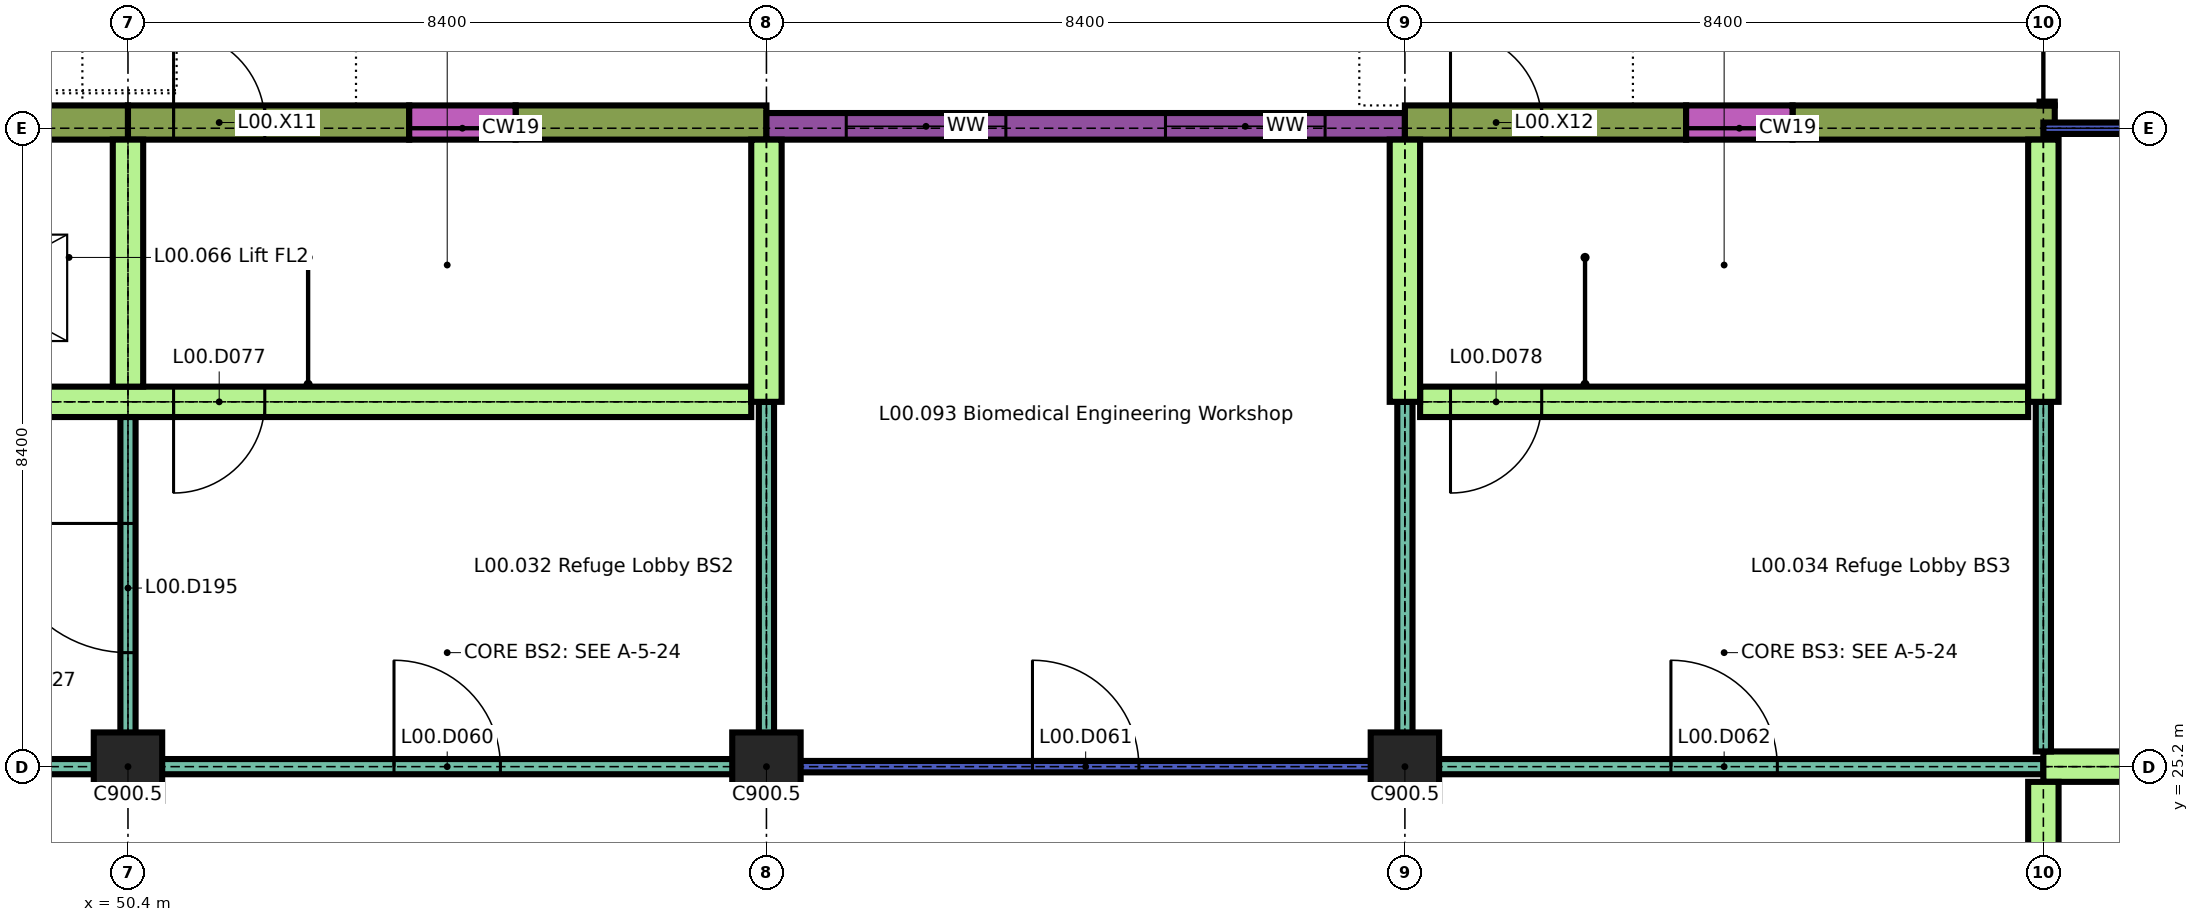
"""IFC4 building model, lengths in metres.
Left out: names, types, materials, properties, quantities, classifications, styles, units other than length and angle.
Written with IfcOpenShell. Run it as: python <this file> out.ifc"""

import sys

from ifc_helpers import new_model, si_unit, direction, frame, frame_2d, origin, origin_2d, place, context, subcontext, project, spatial, rectangle, extrude, element, fill, save


model = new_model("IFC4")
c1 = context("Model", 3, precision=1e-05, world=origin(), true_north=direction((0.0, 1.0)))
c2 = subcontext(c1, "Body", "Model", "MODEL_VIEW")
j1 = project(units=[si_unit("LENGTHUNIT", "METRE"), si_unit("PLANEANGLEUNIT", "RADIAN")], contexts=[c1])
p1 = place(None, origin())
s1 = spatial("IfcSite", under=j1, at=p1, CompositionType="ELEMENT")
p2 = place(p1, origin())
s2 = spatial("IfcBuilding", under=s1, at=p2, CompositionType="ELEMENT")
p3 = place(p2, origin())
s3 = spatial("IfcBuildingStorey", under=s2, at=p3, CompositionType="ELEMENT", Elevation=0.0)
p4 = place(p3, frame((46.2, 33.675, 0.0), z_axis=(0.0, 0.0, 1.0), x_axis=(1.0, 0.0, 0.0)))
e1 = element("IfcWall", 1, at=p4, inside=s3, PredefinedType="SOLIDWALL", context=c2, shape_type="SweptSolid", body=[
    extrude(rectangle(XDim=4.2, YDim=0.45, at=frame_2d((2.1, 0.0))), origin(), (0.0, 0.0, 1.0), 4.14),
])
p5 = place(p3, frame((50.4, 33.675, 0.0), z_axis=(0.0, 0.0, 1.0), x_axis=(1.0, 0.0, 0.0)))
e2 = element("IfcWall", 2, at=p5, inside=s3, PredefinedType="SOLIDWALL", context=c2, shape_type="SweptSolid", body=[
    extrude(rectangle(XDim=3.7, YDim=0.45, at=frame_2d((1.85, 0.0))), origin(), (0.0, 0.0, 1.0), 4.14),
])
p6 = place(p5, frame((0.6, 0.0, 0.0)))
e3 = element("IfcOpeningElement", 3, at=p6, cuts=e2, PredefinedType="OPENING", context=c2, shape_type="SweptSolid", body=[
    extrude(rectangle(XDim=1.2, YDim=2.1, at=frame_2d((0.6, 1.05))), frame((0.0, 0.235, 0.0), z_axis=(0.0, -1.0, 0.0), x_axis=(1.0, 0.0, 0.0)), (0.0, 0.0, 1.0), 0.47),
])
p7 = place(p3, frame((55.5, 33.675, 0.0), z_axis=(0.0, 0.0, 1.0), x_axis=(1.0, 0.0, 0.0)))
e4 = element("IfcWall", 4, at=p7, inside=s3, PredefinedType="SOLIDWALL", context=c2, shape_type="SweptSolid", body=[
    extrude(rectangle(XDim=3.3, YDim=0.45, at=frame_2d((1.65, 0.0))), origin(), (0.0, 0.0, 1.0), 4.14),
])
p8 = place(p3, frame((54.1, 33.675, 0.0), z_axis=(0.0, 0.0, 1.0), x_axis=(1.0, 0.0, 0.0)))
e5 = element("IfcWall", 5, at=p8, inside=s3, PredefinedType="SOLIDWALL", context=c2, shape_type="SweptSolid", body=[
    extrude(rectangle(XDim=1.4, YDim=0.45, at=frame_2d((0.7, 0.0))), origin(), (0.0, 0.0, 1.0), 0.6),
])
p9 = place(p3, frame((58.8, 33.625, 0.0), z_axis=(0.0, 0.0, 1.0), x_axis=(1.0, 0.0, 0.0)))
e6 = element("IfcWall", 6, at=p9, inside=s3, PredefinedType="SOLIDWALL", context=c2, shape_type="SweptSolid", body=[
    extrude(rectangle(XDim=8.4, YDim=0.35, at=frame_2d((4.2, 0.0))), origin(), (0.0, 0.0, 1.0), 3.84),
])
p10 = place(p9, frame((1.05, 0.0, 2.4)))
e7 = element("IfcOpeningElement", 7, at=p10, cuts=e6, PredefinedType="OPENING", context=c2, shape_type="SweptSolid", body=[
    extrude(rectangle(XDim=2.1, YDim=0.9, at=frame_2d((1.05, 0.45))), frame((0.0, 0.185, 0.0), z_axis=(0.0, -1.0, 0.0), x_axis=(1.0, 0.0, 0.0)), (0.0, 0.0, 1.0), 0.37),
])
p11 = place(p9, frame((5.25, 0.0, 2.4)))
e8 = element("IfcOpeningElement", 8, at=p11, cuts=e6, PredefinedType="OPENING", context=c2, shape_type="SweptSolid", body=[
    extrude(rectangle(XDim=2.1, YDim=0.9, at=frame_2d((1.05, 0.45))), frame((0.0, 0.185, 0.0), z_axis=(0.0, -1.0, 0.0), x_axis=(1.0, 0.0, 0.0)), (0.0, 0.0, 1.0), 0.37),
])
p12 = place(p3, frame((67.2, 33.675, 0.0), z_axis=(0.0, 0.0, 1.0), x_axis=(1.0, 0.0, 0.0)))
e9 = element("IfcWall", 9, at=p12, inside=s3, PredefinedType="SOLIDWALL", context=c2, shape_type="SweptSolid", body=[
    extrude(rectangle(XDim=3.7, YDim=0.45, at=frame_2d((1.85, 0.0))), origin(), (0.0, 0.0, 1.0), 4.14),
])
p13 = place(p12, frame((0.6, 0.0, 0.0)))
e10 = element("IfcOpeningElement", 10, at=p13, cuts=e9, PredefinedType="OPENING", context=c2, shape_type="SweptSolid", body=[
    extrude(rectangle(XDim=1.2, YDim=2.1, at=frame_2d((0.6, 1.05))), frame((0.0, 0.235, 0.0), z_axis=(0.0, -1.0, 0.0), x_axis=(1.0, 0.0, 0.0)), (0.0, 0.0, 1.0), 0.47),
])
p14 = place(p3, frame((72.3, 33.675, 0.0), z_axis=(0.0, 0.0, 1.0), x_axis=(1.0, 0.0, 0.0)))
e11 = element("IfcWall", 11, at=p14, inside=s3, PredefinedType="SOLIDWALL", context=c2, shape_type="SweptSolid", body=[
    extrude(rectangle(XDim=3.45, YDim=0.45, at=frame_2d((1.725, 0.0))), origin(), (0.0, 0.0, 1.0), 4.14),
])
p15 = place(p3, frame((70.9, 33.675, 0.0), z_axis=(0.0, 0.0, 1.0), x_axis=(1.0, 0.0, 0.0)))
e12 = element("IfcWall", 12, at=p15, inside=s3, PredefinedType="SOLIDWALL", context=c2, shape_type="SweptSolid", body=[
    extrude(rectangle(XDim=1.4, YDim=0.45, at=frame_2d((0.7, 0.0))), origin(), (0.0, 0.0, 1.0), 0.6),
])
p16 = place(p3, frame((75.65, 33.9, 0.0), z_axis=(0.0, 0.0, 1.0), x_axis=(0.0, 1.0, 0.0)))
e13 = element("IfcWall", 13, at=p16, inside=s3, PredefinedType="SOLIDWALL", context=c2, shape_type="SweptSolid", body=[
    extrude(rectangle(XDim=0.05, YDim=0.2, at=frame_2d((0.025, 0.0))), origin(), (0.0, 0.0, 1.0), 3.164),
])
p17 = place(p3, frame((46.2, 25.2, 0.0), z_axis=(0.0, 0.0, 1.0), x_axis=(1.0, 0.0, 0.0)))
e14 = element("IfcWall", 14, at=p17, inside=s3, PredefinedType="PARTITIONING", context=c2, shape_type="SweptSolid", body=[
    extrude(rectangle(XDim=12.6, YDim=0.2, at=frame_2d((6.3, 0.0))), origin(), (0.0, 0.0, 1.0), 4.14),
])
p18 = place(p17, frame((7.7, 0.0, 0.0)))
e15 = element("IfcOpeningElement", 15, at=p18, cuts=e14, PredefinedType="OPENING", context=c2, shape_type="SweptSolid", body=[
    extrude(rectangle(XDim=1.4, YDim=2.1, at=frame_2d((0.7, 1.05))), frame((0.0, 0.11, 0.0), z_axis=(0.0, -1.0, 0.0), x_axis=(1.0, 0.0, 0.0)), (0.0, 0.0, 1.0), 0.22),
])
p19 = place(p3, frame((58.8, 25.2, 0.0), z_axis=(0.0, 0.0, 1.0), x_axis=(1.0, 0.0, 0.0)))
e16 = element("IfcWall", 16, at=p19, inside=s3, PredefinedType="PARTITIONING", context=c2, shape_type="SweptSolid", body=[
    extrude(rectangle(XDim=8.4, YDim=0.15, at=frame_2d((4.2, 0.0))), origin(), (0.0, 0.0, 1.0), 4.14),
])
p20 = place(p19, frame((3.5, 0.0, 0.0)))
e17 = element("IfcOpeningElement", 17, at=p20, cuts=e16, PredefinedType="OPENING", context=c2, shape_type="SweptSolid", body=[
    extrude(rectangle(XDim=1.4, YDim=2.1, at=frame_2d((0.7, 1.05))), frame((0.0, 0.085, 0.0), z_axis=(0.0, -1.0, 0.0), x_axis=(1.0, 0.0, 0.0)), (0.0, 0.0, 1.0), 0.17),
])
p21 = place(p3, frame((67.2, 25.2, 0.0), z_axis=(0.0, 0.0, 1.0), x_axis=(1.0, 0.0, 0.0)))
e18 = element("IfcWall", 18, at=p21, inside=s3, PredefinedType="PARTITIONING", context=c2, shape_type="SweptSolid", body=[
    extrude(rectangle(XDim=8.4, YDim=0.2, at=frame_2d((4.2, 0.0))), origin(), (0.0, 0.0, 1.0), 4.14),
])
p22 = place(p21, frame((3.5, 0.0, 0.0)))
e19 = element("IfcOpeningElement", 19, at=p22, cuts=e18, PredefinedType="OPENING", context=c2, shape_type="SweptSolid", body=[
    extrude(rectangle(XDim=1.4, YDim=2.1, at=frame_2d((0.7, 1.05))), frame((0.0, 0.11, 0.0), z_axis=(0.0, -1.0, 0.0), x_axis=(1.0, 0.0, 0.0)), (0.0, 0.0, 1.0), 0.22),
])
p23 = place(p3, frame((75.6, 25.2, 0.0), z_axis=(0.0, 0.0, 1.0), x_axis=(1.0, 0.0, 0.0)))
e20 = element("IfcWall", 20, at=p23, inside=s3, PredefinedType="SHEAR", context=c2, shape_type="SweptSolid", body=[
    extrude(rectangle(XDim=21.2, YDim=0.4, at=frame_2d((10.6, 0.0))), origin(), (0.0, 0.0, 1.0), 4.14),
])
p24 = place(p3, frame((46.4, 30.0, 0.0), z_axis=(0.0, 0.0, 1.0), x_axis=(1.0, 0.0, 0.0)))
e21 = element("IfcWall", 21, at=p24, inside=s3, PredefinedType="SHEAR", context=c2, shape_type="SweptSolid", body=[
    extrude(rectangle(XDim=12.2, YDim=0.4, at=frame_2d((6.1, 0.0))), origin(), (0.0, 0.0, 1.0), 4.14),
])
p25 = place(p24, frame((1.35, 0.0, 0.0)))
e22 = element("IfcOpeningElement", 22, at=p25, cuts=e21, PredefinedType="OPENING", context=c2, shape_type="SweptSolid", body=[
    extrude(rectangle(XDim=1.3, YDim=2.1, at=frame_2d((0.65, 1.05))), frame((0.0, 0.21, 0.0), z_axis=(0.0, -1.0, 0.0), x_axis=(1.0, 0.0, 0.0)), (0.0, 0.0, 1.0), 0.42),
])
p26 = place(p24, frame((4.6, 0.0, 0.0)))
e23 = element("IfcOpeningElement", 23, at=p26, cuts=e21, PredefinedType="OPENING", context=c2, shape_type="SweptSolid", body=[
    extrude(rectangle(XDim=1.2, YDim=2.1, at=frame_2d((0.6, 1.05))), frame((0.0, 0.21, 0.0), z_axis=(0.0, -1.0, 0.0), x_axis=(1.0, 0.0, 0.0)), (0.0, 0.0, 1.0), 0.42),
])
p27 = place(p3, frame((67.4, 30.0, 0.0), z_axis=(0.0, 0.0, 1.0), x_axis=(1.0, 0.0, 0.0)))
e24 = element("IfcWall", 24, at=p27, inside=s3, PredefinedType="SHEAR", context=c2, shape_type="SweptSolid", body=[
    extrude(rectangle(XDim=8.0, YDim=0.4, at=frame_2d((4.0, 0.0))), origin(), (0.0, 0.0, 1.0), 4.14),
])
p28 = place(p27, frame((0.4, 0.0, 0.0)))
e25 = element("IfcOpeningElement", 25, at=p28, cuts=e24, PredefinedType="OPENING", context=c2, shape_type="SweptSolid", body=[
    extrude(rectangle(XDim=1.2, YDim=2.1, at=frame_2d((0.6, 1.05))), frame((0.0, 0.21, 0.0), z_axis=(0.0, -1.0, 0.0), x_axis=(1.0, 0.0, 0.0)), (0.0, 0.0, 1.0), 0.42),
])
p29 = place(p3, frame((75.6, 33.6, 0.0), z_axis=(0.0, 0.0, 1.0), x_axis=(1.0, 0.0, 0.0)))
e26 = element("IfcWall", 26, at=p29, inside=s3, PredefinedType="PARTITIONING", context=c2, shape_type="SweptSolid", body=[
    extrude(rectangle(XDim=7.975, YDim=0.15, at=frame_2d((3.987, 0.0))), origin(), (0.0, 0.0, 1.0), 4.14),
])
p30 = place(p3, frame((50.4, 25.3, 0.0), z_axis=(0.0, 0.0, 1.0), x_axis=(0.0, 1.0, 0.0)))
e27 = element("IfcWall", 27, at=p30, inside=s3, PredefinedType="PARTITIONING", context=c2, shape_type="SweptSolid", body=[
    extrude(rectangle(XDim=4.5, YDim=0.2, at=frame_2d((2.25, 0.0))), origin(), (0.0, 0.0, 1.0), 4.14),
])
p31 = place(p30, frame((1.4, 0.0, 0.0)))
e28 = element("IfcOpeningElement", 28, at=p31, cuts=e27, PredefinedType="OPENING", context=c2, shape_type="SweptSolid", body=[
    extrude(rectangle(XDim=1.7, YDim=2.4, at=frame_2d((0.85, 1.2))), frame((0.0, 0.11, 0.0), z_axis=(0.0, -1.0, 0.0), x_axis=(1.0, 0.0, 0.0)), (0.0, 0.0, 1.0), 0.22),
])
p32 = place(p3, frame((50.4, 30.2, 0.0), z_axis=(0.0, 0.0, 1.0), x_axis=(0.0, 1.0, 0.0)))
e29 = element("IfcWall", 29, at=p32, inside=s3, PredefinedType="SHEAR", context=c2, shape_type="SweptSolid", body=[
    extrude(rectangle(XDim=3.25, YDim=0.4, at=frame_2d((1.625, 0.0))), origin(), (0.0, 0.0, 1.0), 4.14),
])
p33 = place(p3, frame((58.8, 25.3, 0.0), z_axis=(0.0, 0.0, 1.0), x_axis=(0.0, 1.0, 0.0)))
e30 = element("IfcWall", 30, at=p33, inside=s3, PredefinedType="PARTITIONING", context=c2, shape_type="SweptSolid", body=[
    extrude(rectangle(XDim=4.7, YDim=0.2, at=frame_2d((2.35, 0.0))), origin(), (0.0, 0.0, 1.0), 4.14),
])
p34 = place(p3, frame((58.8, 30.0, 0.0), z_axis=(0.0, 0.0, 1.0), x_axis=(0.0, 1.0, 0.0)))
e31 = element("IfcWall", 31, at=p34, inside=s3, PredefinedType="SHEAR", context=c2, shape_type="SweptSolid", body=[
    extrude(rectangle(XDim=3.45, YDim=0.4, at=frame_2d((1.725, 0.0))), origin(), (0.0, 0.0, 1.0), 4.14),
])
p35 = place(p3, frame((67.2, 25.3, 0.0), z_axis=(0.0, 0.0, 1.0), x_axis=(0.0, 1.0, 0.0)))
e32 = element("IfcWall", 32, at=p35, inside=s3, PredefinedType="PARTITIONING", context=c2, shape_type="SweptSolid", body=[
    extrude(rectangle(XDim=4.7, YDim=0.2, at=frame_2d((2.35, 0.0))), origin(), (0.0, 0.0, 1.0), 4.14),
])
p36 = place(p3, frame((67.2, 30.0, 0.0), z_axis=(0.0, 0.0, 1.0), x_axis=(0.0, 1.0, 0.0)))
e33 = element("IfcWall", 33, at=p36, inside=s3, PredefinedType="SHEAR", context=c2, shape_type="SweptSolid", body=[
    extrude(rectangle(XDim=3.45, YDim=0.4, at=frame_2d((1.725, 0.0))), origin(), (0.0, 0.0, 1.0), 4.14),
])
p37 = place(p3, frame((75.6, 21.6, 0.0), z_axis=(0.0, 0.0, 1.0), x_axis=(0.0, 1.0, 0.0)))
e34 = element("IfcWall", 34, at=p37, inside=s3, PredefinedType="SHEAR", context=c2, shape_type="SweptSolid", body=[
    extrude(rectangle(XDim=3.4, YDim=0.4, at=frame_2d((1.7, 0.0))), origin(), (0.0, 0.0, 1.0), 4.14),
])
p38 = place(p3, frame((75.6, 25.4, 0.0), z_axis=(0.0, 0.0, 1.0), x_axis=(0.0, 1.0, 0.0)))
e35 = element("IfcWall", 35, at=p38, inside=s3, PredefinedType="PARTITIONING", context=c2, shape_type="SweptSolid", body=[
    extrude(rectangle(XDim=4.6, YDim=0.2, at=frame_2d((2.3, 0.0))), origin(), (0.0, 0.0, 1.0), 4.14),
])
p39 = place(p3, frame((75.6, 30.0, 0.0), z_axis=(0.0, 0.0, 1.0), x_axis=(0.0, 1.0, 0.0)))
e36 = element("IfcWall", 36, at=p39, inside=s3, PredefinedType="SHEAR", context=c2, shape_type="SweptSolid", body=[
    extrude(rectangle(XDim=3.45, YDim=0.4, at=frame_2d((1.725, 0.0))), origin(), (0.0, 0.0, 1.0), 4.14),
])
for number, where, z_axis, x_axis in (
    (37, (50.4, 25.2, 0.0), (0.0, 0.0, 1.0), (1.0, 0.0, 0.0)),
    (38, (58.8, 25.2, 0.0), (0.0, 0.0, 1.0), (1.0, 0.0, 0.0)),
    (39, (67.2, 25.2, 0.0), (0.0, 0.0, 1.0), (1.0, 0.0, 0.0)),
):
    element("IfcColumn", number, at=place(p3, frame(where, z_axis=z_axis, x_axis=x_axis)), inside=s3, PredefinedType="COLUMN", context=c2, shape_type="SweptSolid", body=[
        extrude(rectangle(XDim=0.9, YDim=0.9, at=origin_2d()), origin(), (0.0, 0.0, 1.0), 4.14),
    ])
p40 = place(p6, origin())
e40 = element("IfcDoor", 40, at=p40, inside=s3, OperationType="SINGLE_SWING_RIGHT", PredefinedType="DOOR", context=c2, shape_type="SweptSolid", body=[
    extrude(rectangle(XDim=1.2, YDim=2.1, at=frame_2d((0.6, 1.05))), frame((0.0, 0.025, 0.0), z_axis=(0.0, -1.0, 0.0), x_axis=(1.0, 0.0, 0.0)), (0.0, 0.0, 1.0), 0.05),
])
fill(e3, e40)
p41 = place(p10, origin())
e41 = element("IfcWindow", 41, at=p41, inside=s3, PartitioningType="SINGLE_PANEL", PredefinedType="WINDOW", context=c2, shape_type="SweptSolid", body=[
    extrude(rectangle(XDim=2.1, YDim=0.9, at=frame_2d((1.05, 0.45))), frame((0.0, 0.03, 0.0), z_axis=(0.0, -1.0, 0.0), x_axis=(1.0, 0.0, 0.0)), (0.0, 0.0, 1.0), 0.06),
])
fill(e7, e41)
p42 = place(p11, origin())
e42 = element("IfcWindow", 42, at=p42, inside=s3, PartitioningType="SINGLE_PANEL", PredefinedType="WINDOW", context=c2, shape_type="SweptSolid", body=[
    extrude(rectangle(XDim=2.1, YDim=0.9, at=frame_2d((1.05, 0.45))), frame((0.0, 0.03, 0.0), z_axis=(0.0, -1.0, 0.0), x_axis=(1.0, 0.0, 0.0)), (0.0, 0.0, 1.0), 0.06),
])
fill(e8, e42)
p43 = place(p13, origin())
e43 = element("IfcDoor", 43, at=p43, inside=s3, OperationType="SINGLE_SWING_RIGHT", PredefinedType="DOOR", context=c2, shape_type="SweptSolid", body=[
    extrude(rectangle(XDim=1.2, YDim=2.1, at=frame_2d((0.6, 1.05))), frame((0.0, 0.025, 0.0), z_axis=(0.0, -1.0, 0.0), x_axis=(1.0, 0.0, 0.0)), (0.0, 0.0, 1.0), 0.05),
])
fill(e10, e43)
p44 = place(p18, origin())
e44 = element("IfcDoor", 44, at=p44, inside=s3, OperationType="SINGLE_SWING_RIGHT", PredefinedType="DOOR", context=c2, shape_type="SweptSolid", body=[
    extrude(rectangle(XDim=1.4, YDim=2.1, at=frame_2d((0.7, 1.05))), frame((0.0, 0.03, 0.0), z_axis=(0.0, -1.0, 0.0), x_axis=(1.0, 0.0, 0.0)), (0.0, 0.0, 1.0), 0.06),
])
fill(e15, e44)
p45 = place(p20, origin())
e45 = element("IfcDoor", 45, at=p45, inside=s3, OperationType="SINGLE_SWING_RIGHT", PredefinedType="DOOR", context=c2, shape_type="SweptSolid", body=[
    extrude(rectangle(XDim=1.4, YDim=2.1, at=frame_2d((0.7, 1.05))), frame((0.0, 0.025, 0.0), z_axis=(0.0, -1.0, 0.0), x_axis=(1.0, 0.0, 0.0)), (0.0, 0.0, 1.0), 0.05),
])
fill(e17, e45)
p46 = place(p22, origin())
e46 = element("IfcDoor", 46, at=p46, inside=s3, OperationType="SINGLE_SWING_RIGHT", PredefinedType="DOOR", context=c2, shape_type="SweptSolid", body=[
    extrude(rectangle(XDim=1.4, YDim=2.1, at=frame_2d((0.7, 1.05))), frame((0.0, 0.03, 0.0), z_axis=(0.0, -1.0, 0.0), x_axis=(1.0, 0.0, 0.0)), (0.0, 0.0, 1.0), 0.06),
])
fill(e19, e46)
p47 = place(p26, origin())
e47 = element("IfcDoor", 47, at=p47, inside=s3, OperationType="SINGLE_SWING_LEFT", PredefinedType="DOOR", context=c2, shape_type="SweptSolid", body=[
    extrude(rectangle(XDim=1.2, YDim=2.1, at=frame_2d((0.6, 1.05))), frame((0.0, 0.025, 0.0), z_axis=(0.0, -1.0, 0.0), x_axis=(1.0, 0.0, 0.0)), (0.0, 0.0, 1.0), 0.05),
])
fill(e23, e47)
p48 = place(p28, origin())
e48 = element("IfcDoor", 48, at=p48, inside=s3, OperationType="SINGLE_SWING_LEFT", PredefinedType="DOOR", context=c2, shape_type="SweptSolid", body=[
    extrude(rectangle(XDim=1.2, YDim=2.1, at=frame_2d((0.6, 1.05))), frame((0.0, 0.025, 0.0), z_axis=(0.0, -1.0, 0.0), x_axis=(1.0, 0.0, 0.0)), (0.0, 0.0, 1.0), 0.05),
])
fill(e25, e48)
p49 = place(p31, origin())
e49 = element("IfcDoor", 49, at=p49, inside=s3, OperationType="SINGLE_SWING_LEFT", PredefinedType="DOOR", context=c2, shape_type="SweptSolid", body=[
    extrude(rectangle(XDim=1.7, YDim=2.4, at=frame_2d((0.85, 1.2))), frame((0.0, 0.025, 0.0), z_axis=(0.0, -1.0, 0.0), x_axis=(1.0, 0.0, 0.0)), (0.0, 0.0, 1.0), 0.05),
])
fill(e28, e49)
save(model, sys.argv[1])
